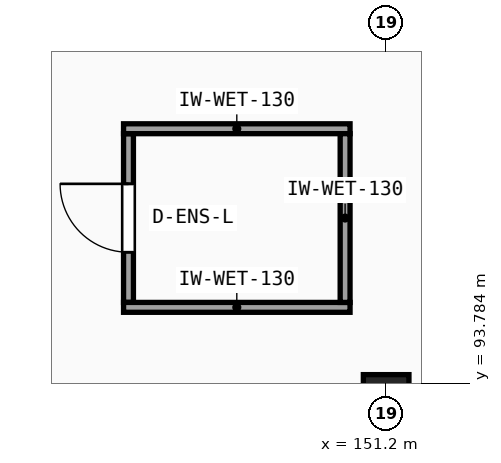
"""IFC4 building model, lengths in metres.
Left out: names, types, materials, properties, quantities, classifications, styles, units other than length and angle.
Written with IfcOpenShell. Run it as: python <this file> out.ifc"""

import sys

from ifc_helpers import new_model, si_unit, direction, frame, frame_2d, origin, origin_2d, place, context, subcontext, project, spatial, rectangle, extrude, element, fill, save


model = new_model("IFC4")
c1 = context("Model", 3, precision=1e-05, world=origin(), true_north=direction((0.0, 1.0)))
c2 = subcontext(c1, "Body", "Model", "MODEL_VIEW")
j1 = project(units=[si_unit("LENGTHUNIT", "METRE"), si_unit("PLANEANGLEUNIT", "RADIAN")], contexts=[c1])
p1 = place(None, origin())
s1 = spatial("IfcSite", under=j1, at=p1, CompositionType="ELEMENT")
p2 = place(p1, origin())
s2 = spatial("IfcBuilding", under=s1, at=p2, CompositionType="ELEMENT")
p3 = place(p2, frame((0.0, 0.0, 22.95)))
s3 = spatial("IfcBuildingStorey", under=s2, at=p3, CompositionType="ELEMENT", Elevation=22.95)
p4 = place(p3, frame((151.2, 93.6, 0.0), z_axis=(0.0, 0.0, 1.0), x_axis=(1.0, 0.0, 0.0)))
e1 = element("IfcColumn", 1, at=p4, inside=s3, PredefinedType="COLUMN", context=c2, shape_type="SweptSolid", body=[
    extrude(rectangle(XDim=0.6, YDim=0.6, at=origin_2d()), origin(), (0.0, 0.0, 1.0), 4.05),
])
p5 = place(p3, frame((147.81, 94.85, 0.0), z_axis=(0.0, 0.0, 1.0), x_axis=(0.0, 1.0, 0.0)))
e2 = element("IfcWall", 2, at=p5, inside=s3, PredefinedType="PARTITIONING", context=c2, shape_type="SweptSolid", body=[
    extrude(rectangle(XDim=2.22, YDim=0.13, at=frame_2d((1.11, 0.0))), origin(), (0.0, 0.0, 1.0), 3.77),
])
p6 = place(p5, frame((0.66, 0.0, 0.0)))
e3 = element("IfcOpeningElement", 3, at=p6, cuts=e2, PredefinedType="OPENING", context=c2, shape_type="SweptSolid", body=[
    extrude(rectangle(XDim=0.9, YDim=2.1, at=frame_2d((0.45, 1.05))), frame((0.0, 0.075, 0.0), z_axis=(0.0, -1.0, 0.0), x_axis=(1.0, 0.0, 0.0)), (0.0, 0.0, 1.0), 0.15),
])
for number, where, z_axis, x_axis in (
    (4, (147.745, 94.785, 0.0), (0.0, 0.0, 1.0), (1.0, 0.0, 0.0)),
    (5, (147.745, 97.135, 0.0), (0.0, 0.0, 1.0), (1.0, 0.0, 0.0)),
):
    element("IfcWall", number, at=place(p3, frame(where, z_axis=z_axis, x_axis=x_axis)), inside=s3, PredefinedType="PARTITIONING", context=c2, shape_type="SweptSolid", body=[
        extrude(rectangle(XDim=2.98, YDim=0.13, at=frame_2d((1.49, 0.0))), origin(), (0.0, 0.0, 1.0), 3.77),
    ])
p7 = place(p3, frame((150.66, 94.85, 0.0), z_axis=(0.0, 0.0, 1.0), x_axis=(0.0, 1.0, 0.0)))
e6 = element("IfcWall", 6, at=p7, inside=s3, PredefinedType="PARTITIONING", context=c2, shape_type="SweptSolid", body=[
    extrude(rectangle(XDim=2.22, YDim=0.13, at=frame_2d((1.11, 0.0))), origin(), (0.0, 0.0, 1.0), 3.77),
])
p8 = place(p6, origin())
e7 = element("IfcDoor", 7, at=p8, inside=s3, OperationType="SINGLE_SWING_RIGHT", PredefinedType="DOOR", context=c2, shape_type="SweptSolid", body=[
    extrude(rectangle(XDim=0.9, YDim=2.1, at=frame_2d((0.45, 1.05))), frame((0.0, 0.025, 0.0), z_axis=(0.0, -1.0, 0.0), x_axis=(1.0, 0.0, 0.0)), (0.0, 0.0, 1.0), 0.05),
])
fill(e3, e7)
save(model, sys.argv[1])
